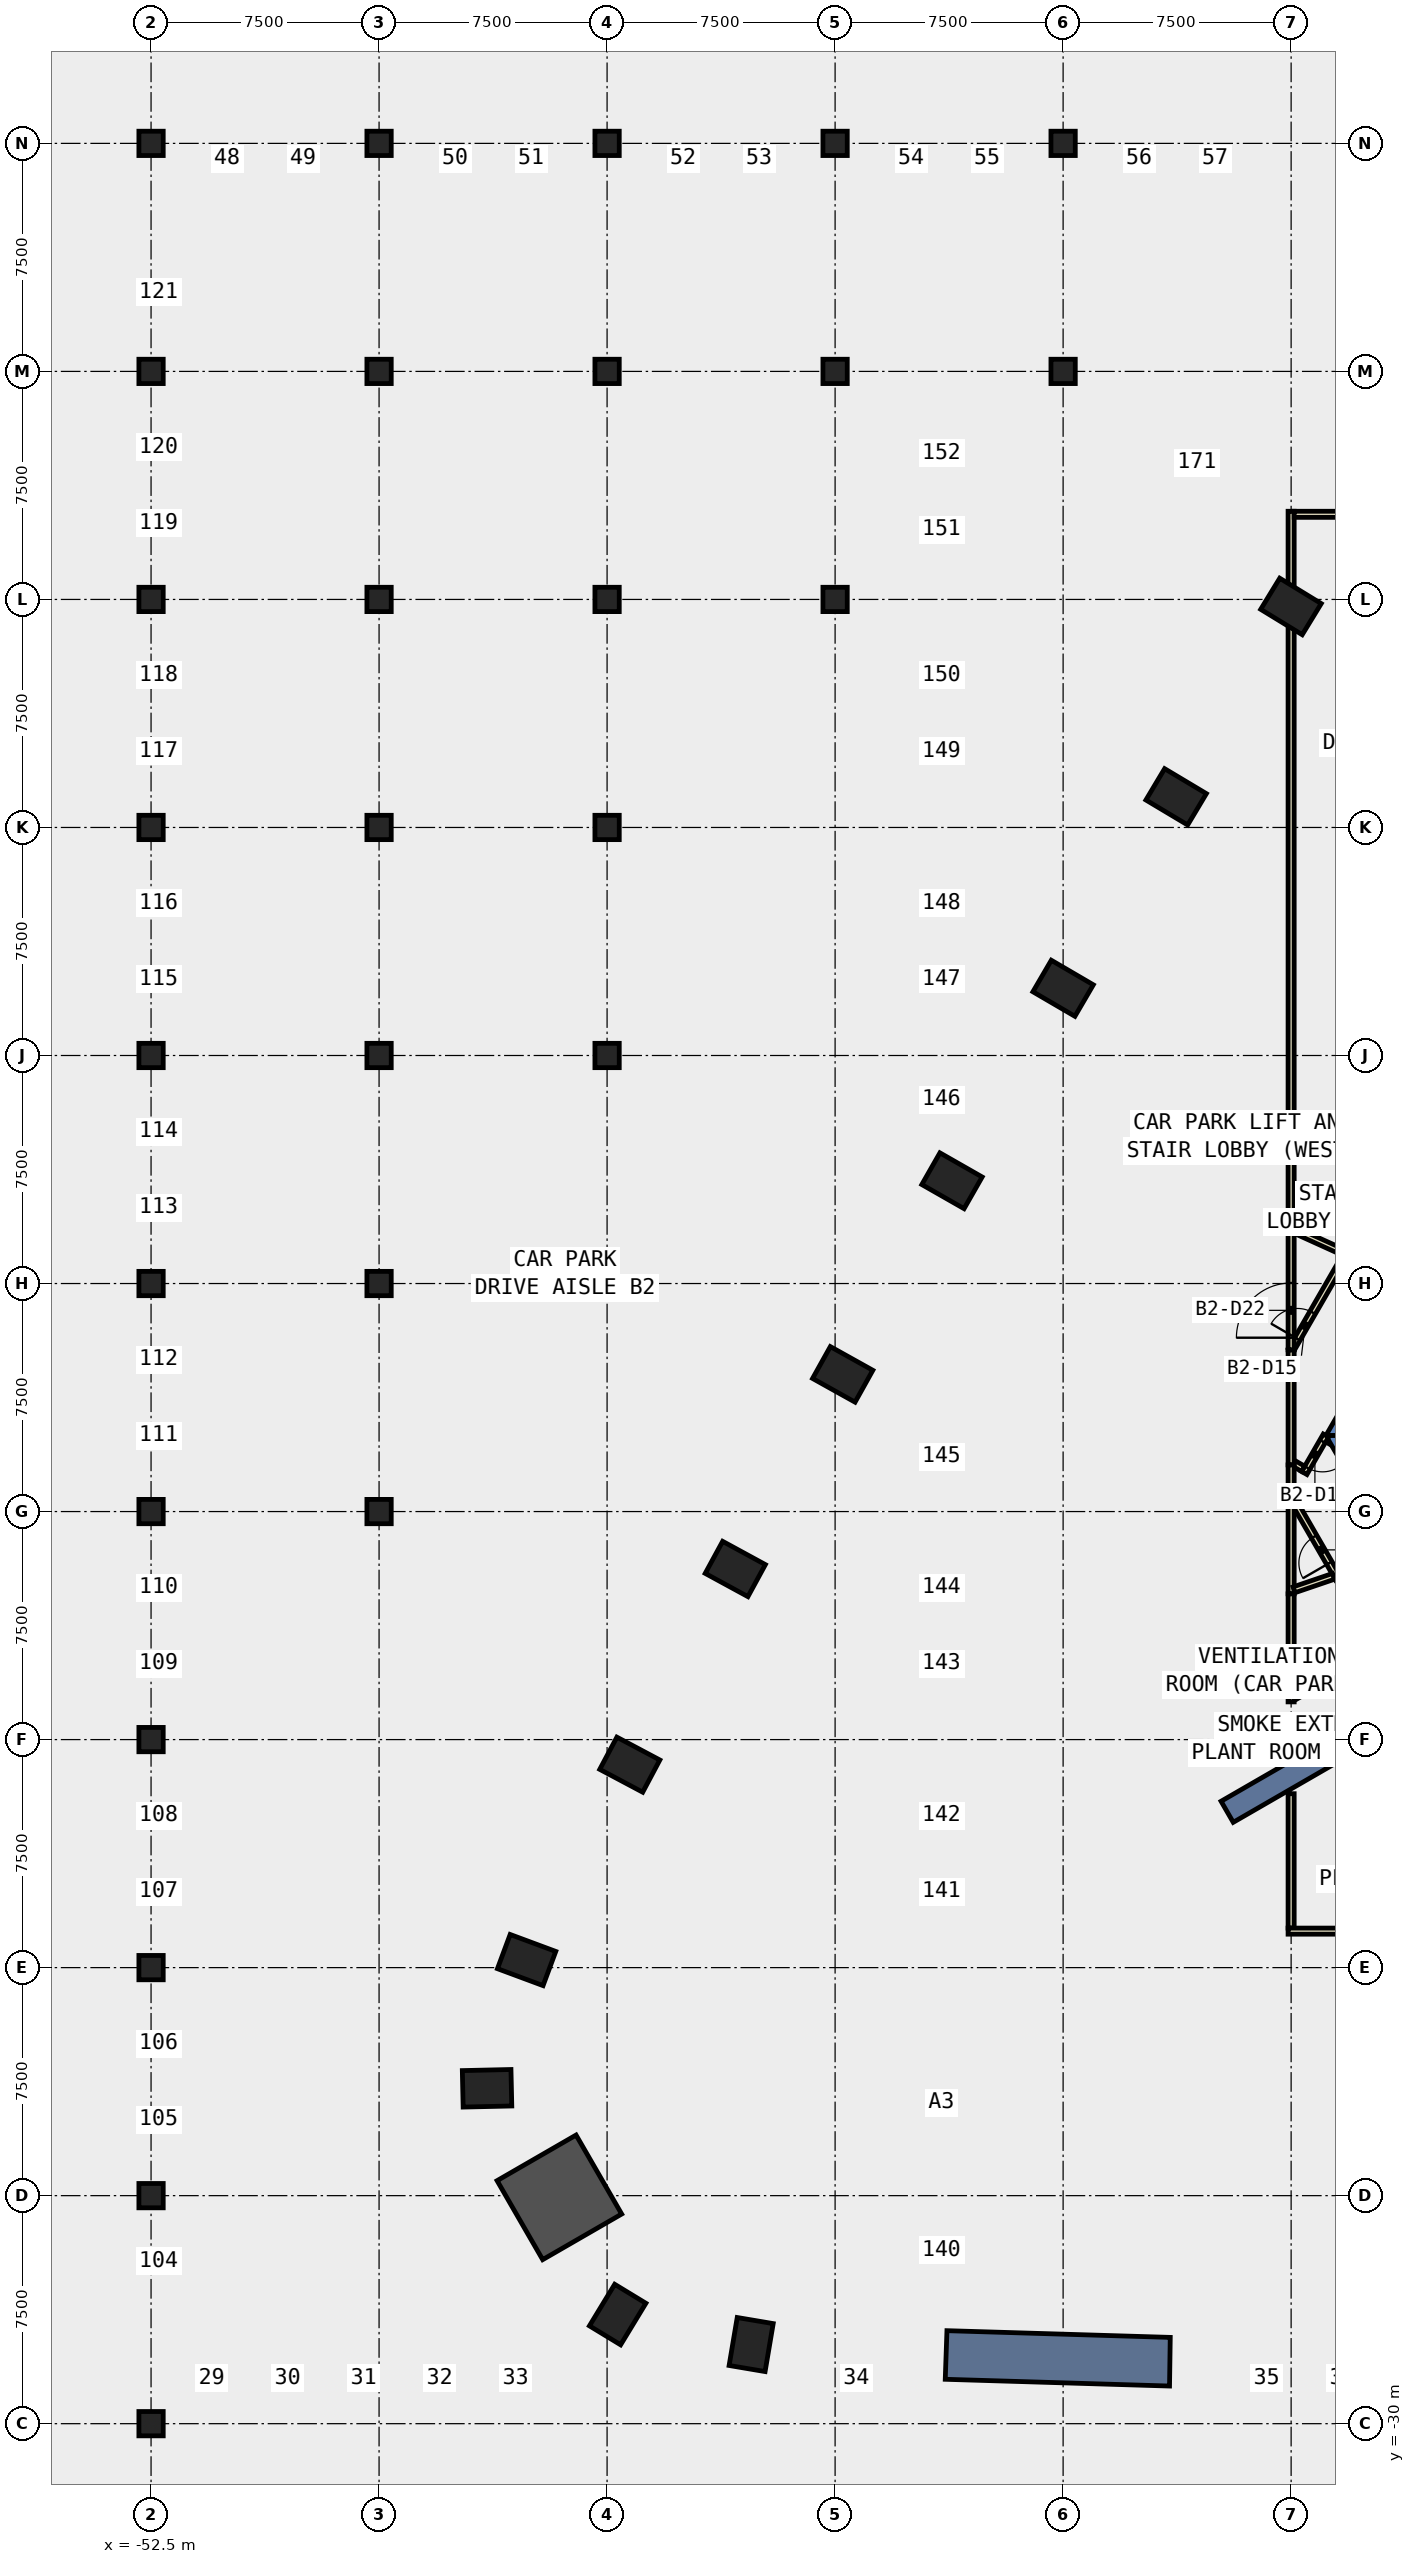
"""IFC4 building model, lengths in metres.
Left out: names, types, materials, properties, quantities, classifications, styles, units other than length and angle.
Written with IfcOpenShell. Run it as: python <this file> out.ifc"""

import sys

from ifc_helpers import new_model, si_unit, direction, frame, frame_2d, origin, origin_2d, place, context, subcontext, project, spatial, polyline, rectangle, outline, extrude, element, fill, save


model = new_model("IFC4")
c1 = context("Model", 3, precision=1e-05, world=origin(), true_north=direction((0.0, 1.0)))
c2 = subcontext(c1, "Body", "Model", "MODEL_VIEW")
j1 = project(units=[si_unit("LENGTHUNIT", "METRE"), si_unit("PLANEANGLEUNIT", "RADIAN")], contexts=[c1])
p1 = place(None, origin())
s1 = spatial("IfcSite", under=j1, at=p1, CompositionType="ELEMENT")
p2 = place(p1, origin())
s2 = spatial("IfcBuilding", under=s1, at=p2, CompositionType="ELEMENT")
p3 = place(p2, frame((0.0, 0.0, -11.0)))
s3 = spatial("IfcBuildingStorey", under=s2, at=p3, CompositionType="ELEMENT", Elevation=-11.0)
for number, where, z_axis, x_axis in (
    (1, (-52.5, -30.0, -0.42), (0.0, 0.0, 1.0), (1.0, 0.0, 0.0)),
    (2, (-52.5, -22.5, -0.42), (0.0, 0.0, 1.0), (1.0, 0.0, 0.0)),
    (3, (-52.5, -15.0, -0.42), (0.0, 0.0, 1.0), (1.0, 0.0, 0.0)),
    (4, (-52.5, -7.5, -0.42), (0.0, 0.0, 1.0), (1.0, 0.0, 0.0)),
    (5, (-52.5, 0.0, -0.42), (0.0, 0.0, 1.0), (1.0, 0.0, 0.0)),
    (6, (-52.5, 7.5, -0.42), (0.0, 0.0, 1.0), (1.0, 0.0, 0.0)),
    (7, (-52.5, 15.0, -0.42), (0.0, 0.0, 1.0), (1.0, 0.0, 0.0)),
    (8, (-52.5, 22.5, -0.42), (0.0, 0.0, 1.0), (1.0, 0.0, 0.0)),
    (9, (-52.5, 30.0, -0.42), (0.0, 0.0, 1.0), (1.0, 0.0, 0.0)),
    (10, (-52.5, 37.5, -0.42), (0.0, 0.0, 1.0), (1.0, 0.0, 0.0)),
    (11, (-52.5, 45.0, -0.42), (0.0, 0.0, 1.0), (1.0, 0.0, 0.0)),
    (12, (-45.0, 0.0, -0.42), (0.0, 0.0, 1.0), (1.0, 0.0, 0.0)),
    (13, (-45.0, 7.5, -0.42), (0.0, 0.0, 1.0), (1.0, 0.0, 0.0)),
    (14, (-45.0, 15.0, -0.42), (0.0, 0.0, 1.0), (1.0, 0.0, 0.0)),
    (15, (-45.0, 22.5, -0.42), (0.0, 0.0, 1.0), (1.0, 0.0, 0.0)),
    (16, (-45.0, 30.0, -0.42), (0.0, 0.0, 1.0), (1.0, 0.0, 0.0)),
    (17, (-45.0, 37.5, -0.42), (0.0, 0.0, 1.0), (1.0, 0.0, 0.0)),
    (18, (-45.0, 45.0, -0.42), (0.0, 0.0, 1.0), (1.0, 0.0, 0.0)),
    (19, (-37.5, 15.0, -0.42), (0.0, 0.0, 1.0), (1.0, 0.0, 0.0)),
    (20, (-37.5, 22.5, -0.42), (0.0, 0.0, 1.0), (1.0, 0.0, 0.0)),
    (21, (-37.5, 30.0, -0.42), (0.0, 0.0, 1.0), (1.0, 0.0, 0.0)),
    (22, (-37.5, 37.5, -0.42), (0.0, 0.0, 1.0), (1.0, 0.0, 0.0)),
    (23, (-37.5, 45.0, -0.42), (0.0, 0.0, 1.0), (1.0, 0.0, 0.0)),
    (24, (-30.0, 30.0, -0.42), (0.0, 0.0, 1.0), (1.0, 0.0, 0.0)),
    (25, (-30.0, 37.5, -0.42), (0.0, 0.0, 1.0), (1.0, 0.0, 0.0)),
    (26, (-30.0, 45.0, -0.42), (0.0, 0.0, 1.0), (1.0, 0.0, 0.0)),
    (27, (-22.5, 37.5, -0.42), (0.0, 0.0, 1.0), (1.0, 0.0, 0.0)),
    (28, (-22.5, 45.0, -0.42), (0.0, 0.0, 1.0), (1.0, 0.0, 0.0)),
):
    element("IfcColumn", number, at=place(p3, frame(where, z_axis=z_axis, x_axis=x_axis)), inside=s3, PredefinedType="COLUMN", context=c2, shape_type="SweptSolid", body=[
        extrude(rectangle(XDim=0.8, YDim=0.8, at=origin_2d()), origin(), (0.0, 0.0, 1.0), 5.5),
    ])
for number, where, z_axis, x_axis in (
    (29, (-32.761, -27.397, -0.42), (0.0, 0.0, 1.0), (-0.986, 0.167, 0.0)),
    (30, (-15.005, 29.769, -0.42), (0.0, 0.0, 1.0), (0.522, 0.853, 0.0)),
    (31, (-18.782, 23.508, -0.42), (0.0, 0.0, 1.0), (0.513, 0.858, 0.0)),
    (32, (-22.5, 17.211, -0.42), (0.0, 0.0, 1.0), (0.504, 0.864, 0.0)),
    (33, (-26.155, 10.88, -0.42), (0.0, 0.0, 1.0), (0.496, 0.869, 0.0)),
    (34, (-29.75, 4.512, -0.42), (0.0, 0.0, 1.0), (0.487, 0.873, 0.0)),
    (35, (-33.283, -1.889, -0.42), (0.0, 0.0, 1.0), (0.478, 0.878, 0.0)),
    (36, (-36.753, -8.325, -0.42), (0.0, 0.0, 1.0), (0.469, 0.883, 0.0)),
    (37, (-40.147, -14.751, -0.42), (0.0, 0.0, 1.0), (0.348, 0.937, 0.0)),
    (38, (-41.448, -18.969, -0.42), (0.0, 0.0, 1.0), (-0.023, 1.0, 0.0)),
):
    element("IfcColumn", number, at=place(p3, frame(where, z_axis=z_axis, x_axis=x_axis)), inside=s3, PredefinedType="COLUMN", context=c2, shape_type="SweptSolid", body=[
        extrude(rectangle(XDim=1.2, YDim=1.6, at=origin_2d()), origin(), (0.0, 0.0, 1.0), 5.5),
    ])
p4 = place(p3, frame((-39.069, -22.556, -0.42), z_axis=(0.0, 0.0, 1.0), x_axis=(0.866025403784, 0.5, 0.0)))
e39 = element("IfcColumn", 39, at=p4, inside=s3, PredefinedType="COLUMN", context=c2, shape_type="SweptSolid", body=[
    extrude(rectangle(XDim=3.0, YDim=3.0, at=origin_2d()), origin(), (0.0, 0.0, 1.0), 5.5),
])
p5 = place(p3, frame((-37.152, -26.411, -0.42), z_axis=(0.0, 0.0, 1.0), x_axis=(-0.854522294989, 0.519414716163, 0.0)))
e40 = element("IfcColumn", 40, at=p5, inside=s3, PredefinedType="COLUMN", context=c2, shape_type="SweptSolid", body=[
    extrude(rectangle(XDim=1.2, YDim=1.6, at=origin_2d()), origin(), (0.0, 0.0, 1.0), 5.5),
])
p6 = place(p3, frame((0.0, 0.0, -0.42)))
e41 = element("IfcWall", 41, at=p6, inside=s3, PredefinedType="SHEAR", context=c2, shape_type="SweptSolid", body=[
    extrude(outline(polyline([(-26.377, -28.54), (-19.0, -28.762), (-18.976, -27.162), (-26.321, -26.941), (-26.377, -28.54)])), origin(), (0.0, 0.0, 1.0), 5.5),
])
p7 = place(p3, frame((0.0, 0.0, -0.42)))
e42 = element("IfcWall", 42, at=p7, inside=s3, PredefinedType="SHEAR", context=c2, shape_type="SweptSolid", body=[
    extrude(outline(polyline([(-12.402, 3.02), (-13.267, 3.52), (-13.856, 2.5), (-12.702, 2.5), (-12.402, 3.02)])), origin(), (0.0, 0.0, 1.0), 5.5),
])
p8 = place(p3, frame((0.0, 0.0, -0.42)))
e43 = element("IfcWall", 43, at=p8, inside=s3, PredefinedType="SHEAR", context=c2, shape_type="SweptSolid", body=[
    extrude(outline(polyline([(-13.856, 2.5), (-6.928, -9.5), (-6.351, -8.5), (-12.702, 2.5), (-13.856, 2.5)])), origin(), (0.0, 0.0, 1.0), 5.5),
])
p9 = place(p3, frame((-9.31, -5.375, -0.42), z_axis=(0.0, 0.0, 1.0), x_axis=(-0.866017533419, -0.500013631625, 0.0)))
e44 = element("IfcWall", 44, at=p9, inside=s3, PredefinedType="SHEAR", context=c2, shape_type="SweptSolid", body=[
    extrude(rectangle(XDim=9.0, YDim=0.8, at=frame_2d((4.5, 0.0))), origin(), (0.0, 0.0, 1.0), 5.5),
])
p10 = place(p3, frame((-15.0, -13.7, 0.0), z_axis=(0.0, 0.0, 1.0), x_axis=(0.0, 1.0, 0.0)))
e45 = element("IfcWall", 45, at=p10, inside=s3, PredefinedType="PARTITIONING", context=c2, shape_type="SweptSolid", body=[
    extrude(rectangle(XDim=4.42, YDim=0.2, at=frame_2d((2.21, 0.0))), origin(), (0.0, 0.0, 1.0), 5.05),
])
p11 = place(p3, frame((-8.278, -13.8, 0.0), z_axis=(0.0, 0.0, 1.0), x_axis=(-1.0, 0.0, 0.0)))
e46 = element("IfcWall", 46, at=p11, inside=s3, PredefinedType="PARTITIONING", context=c2, shape_type="SweptSolid", body=[
    extrude(rectangle(XDim=6.822, YDim=0.2, at=frame_2d((3.411, 0.0))), origin(), (0.0, 0.0, 1.0), 5.05),
])
p12 = place(p3, frame((-13.856, 2.5, 0.0), z_axis=(0.0, 0.0, 1.0), x_axis=(-0.499831418649, -0.866122712398, 0.0)))
e47 = element("IfcWall", 47, at=p12, inside=s3, PredefinedType="PARTITIONING", context=c2, shape_type="SweptSolid", body=[
    extrude(rectangle(XDim=1.422, YDim=0.2, at=frame_2d((0.711, 0.0))), origin(), (0.0, 0.0, 1.0), 5.05),
])
p13 = place(p12, frame((0.224, 0.0, 0.0)))
e48 = element("IfcOpeningElement", 48, at=p13, cuts=e47, PredefinedType="OPENING", context=c2, shape_type="SweptSolid", body=[
    extrude(rectangle(XDim=1.0, YDim=2.1, at=frame_2d((0.5, 1.05))), frame((0.0, 0.11, 0.0), z_axis=(0.0, -1.0, 0.0), x_axis=(1.0, 0.0, 0.0)), (0.0, 0.0, 1.0), 0.22),
])
p14 = place(p3, frame((-14.604, 1.405, 0.0), z_axis=(0.0, 0.0, 1.0), x_axis=(-0.865410684717, 0.501063216349, 0.0)))
e49 = element("IfcWall", 49, at=p14, inside=s3, PredefinedType="PARTITIONING", context=c2, shape_type="SweptSolid", body=[
    extrude(rectangle(XDim=0.357, YDim=0.2, at=frame_2d((0.179, 0.0))), origin(), (0.0, 0.0, 1.0), 5.05),
])
p15 = place(p3, frame((-15.0, 5.318, 0.0), z_axis=(0.0, 0.0, 1.0), x_axis=(0.500034145141, 0.866005689181, 0.0)))
e50 = element("IfcWall", 50, at=p15, inside=s3, PredefinedType="PARTITIONING", context=c2, shape_type="SweptSolid", body=[
    extrude(rectangle(XDim=3.91, YDim=0.2, at=frame_2d((1.955, 0.0))), origin(), (0.0, 0.0, 1.0), 5.05),
])
p16 = place(p15, frame((0.418, 0.0, 0.0)))
e51 = element("IfcOpeningElement", 51, at=p16, cuts=e50, PredefinedType="OPENING", context=c2, shape_type="SweptSolid", body=[
    extrude(rectangle(XDim=1.0, YDim=2.1, at=frame_2d((0.5, 1.05))), frame((0.0, 0.11, 0.0), z_axis=(0.0, -1.0, 0.0), x_axis=(1.0, 0.0, 0.0)), (0.0, 0.0, 1.0), 0.22),
])
p17 = place(p3, frame((-15.0, 1.534, 0.0), z_axis=(0.0, 0.0, 1.0), x_axis=(0.0, 1.0, 0.0)))
e52 = element("IfcWall", 52, at=p17, inside=s3, PredefinedType="PARTITIONING", context=c2, shape_type="SweptSolid", body=[
    extrude(rectangle(XDim=3.784, YDim=0.2, at=frame_2d((1.892, 0.0))), origin(), (0.0, 0.0, 1.0), 5.05),
])
p18 = place(p3, frame((-15.0, 0.581, 0.0), z_axis=(0.0, 0.0, 1.0), x_axis=(0.0, 1.0, 0.0)))
e53 = element("IfcWall", 53, at=p18, inside=s3, PredefinedType="PARTITIONING", context=c2, shape_type="SweptSolid", body=[
    extrude(rectangle(XDim=0.953, YDim=0.2, at=frame_2d((0.477, 0.0))), origin(), (0.0, 0.0, 1.0), 5.05),
])
p19 = place(p3, frame((-13.46, -2.186, 0.0), z_axis=(0.0, 0.0, 1.0), x_axis=(-0.500060979923, 0.865990194147, 0.0)))
e54 = element("IfcWall", 54, at=p19, inside=s3, PredefinedType="PARTITIONING", context=c2, shape_type="SweptSolid", body=[
    extrude(rectangle(XDim=3.08, YDim=0.2, at=frame_2d((1.54, 0.0))), origin(), (0.0, 0.0, 1.0), 5.05),
])
p20 = place(p19, frame((0.569, 0.0, 0.0)))
e55 = element("IfcOpeningElement", 55, at=p20, cuts=e54, PredefinedType="OPENING", context=c2, shape_type="SweptSolid", body=[
    extrude(rectangle(XDim=1.0, YDim=2.1, at=frame_2d((0.5, 1.05))), frame((0.0, 0.11, 0.0), z_axis=(0.0, -1.0, 0.0), x_axis=(1.0, 0.0, 0.0)), (0.0, 0.0, 1.0), 0.22),
])
p21 = place(p3, frame((-14.909, 9.264, 0.0), z_axis=(0.0, 0.0, 1.0), x_axis=(0.910722060418, -0.41301976789, 0.0)))
e56 = element("IfcWall", 56, at=p21, inside=s3, PredefinedType="PARTITIONING", context=c2, shape_type="SweptSolid", body=[
    extrude(rectangle(XDim=1.903, YDim=0.2, at=frame_2d((0.951, 0.0))), origin(), (0.0, 0.0, 1.0), 5.05),
])
p22 = place(p3, frame((-15.0, 5.318, 0.0), z_axis=(0.0, 0.0, 1.0), x_axis=(0.0, 1.0, 0.0)))
e57 = element("IfcWall", 57, at=p22, inside=s3, PredefinedType="PARTITIONING", context=c2, shape_type="SweptSolid", body=[
    extrude(rectangle(XDim=4.087, YDim=0.2, at=frame_2d((2.043, 0.0))), origin(), (0.0, 0.0, 1.0), 5.05),
])
p23 = place(p22, frame((0.4, 0.0, 0.0)))
e58 = element("IfcOpeningElement", 58, at=p23, cuts=e57, PredefinedType="OPENING", context=c2, shape_type="SweptSolid", body=[
    extrude(rectangle(XDim=1.8, YDim=2.1, at=frame_2d((0.9, 1.05))), frame((0.0, 0.11, 0.0), z_axis=(0.0, -1.0, 0.0), x_axis=(1.0, 0.0, 0.0)), (0.0, 0.0, 1.0), 0.22),
])
p24 = place(p3, frame((-15.0, 9.405, 0.0), z_axis=(0.0, 0.0, 1.0), x_axis=(0.0, 1.0, 0.0)))
e59 = element("IfcWall", 59, at=p24, inside=s3, PredefinedType="PARTITIONING", context=c2, shape_type="SweptSolid", body=[
    extrude(rectangle(XDim=23.495, YDim=0.2, at=frame_2d((11.748, 0.0))), origin(), (0.0, 0.0, 1.0), 5.05),
])
p25 = place(p3, frame((-14.9, 32.8, 0.0), z_axis=(0.0, 0.0, 1.0), x_axis=(1.0, 0.0, 0.0)))
e60 = element("IfcWall", 60, at=p25, inside=s3, PredefinedType="PARTITIONING", context=c2, shape_type="SweptSolid", body=[
    extrude(rectangle(XDim=15.0, YDim=0.2, at=frame_2d((7.5, 0.0))), origin(), (0.0, 0.0, 1.0), 5.05),
])
p26 = place(p3, frame((-15.0, -2.706, 0.0), z_axis=(0.0, 0.0, 1.0), x_axis=(0.0, 1.0, 0.0)))
e61 = element("IfcWall", 61, at=p26, inside=s3, PredefinedType="PARTITIONING", context=c2, shape_type="SweptSolid", body=[
    extrude(rectangle(XDim=3.287, YDim=0.2, at=frame_2d((1.644, 0.0))), origin(), (0.0, 0.0, 1.0), 5.05),
])
p27 = place(p3, frame((-12.037, -4.45, 0.0), z_axis=(0.0, 0.0, 1.0), x_axis=(-0.866063163075, -0.499934593286, 0.0)))
e62 = element("IfcWall", 62, at=p27, inside=s3, PredefinedType="PARTITIONING", context=c2, shape_type="SweptSolid", body=[
    extrude(rectangle(XDim=3.321, YDim=0.2, at=frame_2d((1.66, 0.0))), origin(), (0.0, 0.0, 1.0), 5.05),
])
p28 = place(p3, frame((-15.0, -6.26, 0.0), z_axis=(0.0, 0.0, 1.0), x_axis=(0.0, 1.0, 0.0)))
e63 = element("IfcWall", 63, at=p28, inside=s3, PredefinedType="PARTITIONING", context=c2, shape_type="SweptSolid", body=[
    extrude(rectangle(XDim=3.554, YDim=0.2, at=frame_2d((1.777, 0.0))), origin(), (0.0, 0.0, 1.0), 5.05),
])
p29 = place(p3, frame((-13.605, -2.131, 0.0), z_axis=(0.0, 0.0, 1.0), x_axis=(-0.946582963452, -0.32246037478, 0.0)))
e64 = element("IfcWall", 64, at=p29, inside=s3, PredefinedType="PARTITIONING", context=c2, shape_type="SweptSolid", body=[
    extrude(rectangle(XDim=1.373, YDim=0.2, at=frame_2d((0.687, 0.0))), origin(), (0.0, 0.0, 1.0), 5.05),
])
p30 = place(p13, origin())
e65 = element("IfcDoor", 65, at=p30, inside=s3, OperationType="SINGLE_SWING_RIGHT", PredefinedType="DOOR", context=c2, shape_type="SweptSolid", body=[
    extrude(rectangle(XDim=1.0, YDim=2.1, at=frame_2d((0.5, 1.05))), frame((0.0, 0.025, 0.0), z_axis=(0.0, -1.0, 0.0), x_axis=(1.0, 0.0, 0.0)), (0.0, 0.0, 1.0), 0.05),
])
fill(e48, e65)
p31 = place(p16, origin())
e66 = element("IfcDoor", 66, at=p31, inside=s3, OperationType="SINGLE_SWING_LEFT", PredefinedType="DOOR", context=c2, shape_type="SweptSolid", body=[
    extrude(rectangle(XDim=1.0, YDim=2.1, at=frame_2d((0.5, 1.05))), frame((0.0, 0.025, 0.0), z_axis=(0.0, -1.0, 0.0), x_axis=(1.0, 0.0, 0.0)), (0.0, 0.0, 1.0), 0.05),
])
fill(e51, e66)
p32 = place(p20, origin())
e67 = element("IfcDoor", 67, at=p32, inside=s3, OperationType="SINGLE_SWING_LEFT", PredefinedType="DOOR", context=c2, shape_type="SweptSolid", body=[
    extrude(rectangle(XDim=1.0, YDim=2.1, at=frame_2d((0.5, 1.05))), frame((0.0, 0.025, 0.0), z_axis=(0.0, -1.0, 0.0), x_axis=(1.0, 0.0, 0.0)), (0.0, 0.0, 1.0), 0.05),
])
fill(e55, e67)
p33 = place(p23, origin())
e68 = element("IfcDoor", 68, at=p33, inside=s3, OperationType="DOUBLE_DOOR_SINGLE_SWING", PredefinedType="DOOR", context=c2, shape_type="SweptSolid", body=[
    extrude(rectangle(XDim=1.8, YDim=2.1, at=frame_2d((0.9, 1.05))), frame((0.0, 0.025, 0.0), z_axis=(0.0, -1.0, 0.0), x_axis=(1.0, 0.0, 0.0)), (0.0, 0.0, 1.0), 0.05),
])
fill(e58, e68)
save(model, sys.argv[1])
